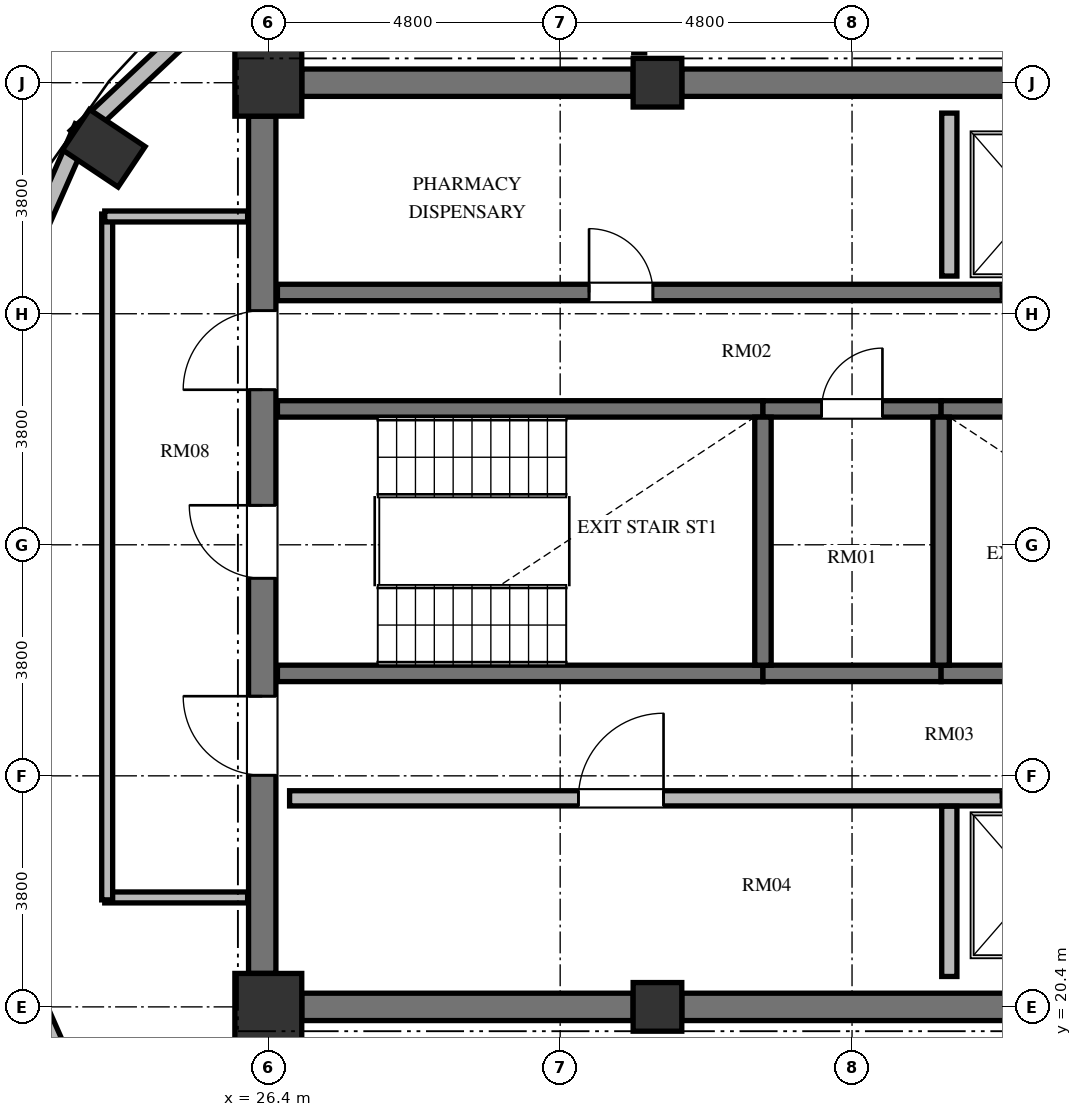
"""IFC4 building model, lengths in metres.
Left out: names, types, materials, properties, quantities, classifications, styles, units other than length and angle.
Written with IfcOpenShell. Run it as: python <this file> out.ifc"""

import sys

from ifc_helpers import new_model, si_unit, direction, frame, frame_2d, origin, origin_2d, place, context, subcontext, project, spatial, rectangle, extrude, element, fill, save


model = new_model("IFC4")
c1 = context("Model", 3, precision=1e-05, world=origin(), true_north=direction((0.0, 1.0)))
c2 = subcontext(c1, "Body", "Model", "MODEL_VIEW")
j1 = project(units=[si_unit("LENGTHUNIT", "METRE"), si_unit("PLANEANGLEUNIT", "RADIAN")], contexts=[c1])
p1 = place(None, origin())
s1 = spatial("IfcSite", under=j1, at=p1, CompositionType="ELEMENT")
p2 = place(p1, origin())
s2 = spatial("IfcBuilding", under=s1, at=p2, CompositionType="ELEMENT")
p3 = place(p2, frame((0.0, 0.0, 291.504)))
s3 = spatial("IfcBuildingStorey", under=s2, at=p3, CompositionType="ELEMENT", Elevation=291.504)
p4 = place(p3, frame((23.694, 34.522, 0.0), z_axis=(0.0, 0.0, 1.0), x_axis=(-0.831469612303, 0.55557023302, 0.0)))
e1 = element("IfcColumn", 1, at=p4, inside=s3, PredefinedType="COLUMN", context=c2, shape_type="SweptSolid", body=[
    extrude(rectangle(XDim=1.1, YDim=0.8, at=origin_2d()), origin(), (0.0, 0.0, 1.0), 3.648),
])
p5 = place(p3, frame((26.4, 20.4, 0.0), z_axis=(0.0, 0.0, 1.0), x_axis=(1.0, 0.0, 0.0)))
e2 = element("IfcColumn", 2, at=p5, inside=s3, PredefinedType="COLUMN", context=c2, shape_type="SweptSolid", body=[
    extrude(rectangle(XDim=1.1, YDim=1.1, at=origin_2d()), origin(), (0.0, 0.0, 1.0), 3.648),
])
for number, where, z_axis, x_axis in (
    (3, (32.8, 20.4, 0.0), (0.0, 0.0, 1.0), (1.0, 0.0, 0.0)),
    (4, (32.8, 35.6, 0.0), (0.0, 0.0, 1.0), (1.0, 0.0, 0.0)),
):
    element("IfcColumn", number, at=place(p3, frame(where, z_axis=z_axis, x_axis=x_axis)), inside=s3, PredefinedType="COLUMN", context=c2, shape_type="SweptSolid", body=[
        extrude(rectangle(XDim=0.8, YDim=0.8, at=origin_2d()), origin(), (0.0, 0.0, 1.0), 3.648),
    ])
p6 = place(p3, frame((26.4, 35.6, 0.0), z_axis=(0.0, 0.0, 1.0), x_axis=(1.0, 0.0, 0.0)))
e5 = element("IfcColumn", 5, at=p6, inside=s3, PredefinedType="COLUMN", context=c2, shape_type="SweptSolid", body=[
    extrude(rectangle(XDim=1.1, YDim=1.1, at=origin_2d()), origin(), (0.0, 0.0, 1.0), 3.648),
])
p7 = place(p3, frame((26.3, 20.95, 0.0), z_axis=(0.0, 0.0, 1.0), x_axis=(0.0, 1.0, 0.0)))
e6 = element("IfcWall", 6, at=p7, inside=s3, PredefinedType="SHEAR", context=c2, shape_type="SweptSolid", body=[
    extrude(rectangle(XDim=14.1, YDim=0.45, at=frame_2d((7.05, 0.0))), origin(), (0.0, 0.0, 1.0), 3.648),
])
p8 = place(p7, frame((6.5, 0.0, 0.0)))
e7 = element("IfcOpeningElement", 7, at=p8, cuts=e6, PredefinedType="OPENING", context=c2, shape_type="SweptSolid", body=[
    extrude(rectangle(XDim=1.2, YDim=2.15, at=frame_2d((0.6, 1.075))), frame((0.0, 0.235, 0.0), z_axis=(0.0, -1.0, 0.0), x_axis=(1.0, 0.0, 0.0)), (0.0, 0.0, 1.0), 0.47),
])
p9 = place(p7, frame((9.6, 0.0, 0.0)))
e8 = element("IfcOpeningElement", 8, at=p9, cuts=e6, PredefinedType="OPENING", context=c2, shape_type="SweptSolid", body=[
    extrude(rectangle(XDim=1.3, YDim=2.2, at=frame_2d((0.65, 1.1))), frame((0.0, 0.235, 0.0), z_axis=(0.0, -1.0, 0.0), x_axis=(1.0, 0.0, 0.0)), (0.0, 0.0, 1.0), 0.47),
])
p10 = place(p7, frame((3.26, 0.0, 0.0)))
e9 = element("IfcOpeningElement", 9, at=p10, cuts=e6, PredefinedType="OPENING", context=c2, shape_type="SweptSolid", body=[
    extrude(rectangle(XDim=1.3, YDim=2.2, at=frame_2d((0.65, 1.1))), frame((0.0, 0.235, 0.0), z_axis=(0.0, -1.0, 0.0), x_axis=(1.0, 0.0, 0.0)), (0.0, 0.0, 1.0), 0.47),
])
for number, where, z_axis, x_axis in (
    (10, (26.95, 20.4, 0.0), (0.0, 0.0, 1.0), (1.0, 0.0, 0.0)),
    (11, (26.95, 35.6, 0.0), (0.0, 0.0, 1.0), (1.0, 0.0, 0.0)),
):
    element("IfcWall", number, at=place(p3, frame(where, z_axis=z_axis, x_axis=x_axis)), inside=s3, PredefinedType="SHEAR", context=c2, shape_type="SweptSolid", body=[
        extrude(rectangle(XDim=5.45, YDim=0.45, at=frame_2d((2.725, 0.0))), origin(), (0.0, 0.0, 1.0), 3.648),
    ])
for number, where, z_axis, x_axis in (
    (12, (33.2, 20.4, 0.0), (0.0, 0.0, 1.0), (1.0, 0.0, 0.0)),
    (13, (33.2, 35.6, 0.0), (0.0, 0.0, 1.0), (1.0, 0.0, 0.0)),
):
    element("IfcWall", number, at=place(p3, frame(where, z_axis=z_axis, x_axis=x_axis)), inside=s3, PredefinedType="SHEAR", context=c2, shape_type="SweptSolid", body=[
        extrude(rectangle(XDim=5.6, YDim=0.45, at=frame_2d((2.8, 0.0))), origin(), (0.0, 0.0, 1.0), 3.648),
    ])
p11 = place(p3, frame((27.595, 38.808, 0.0), z_axis=(0.0, 0.0, 1.0), x_axis=(-0.728251519923, -0.685309947199, 0.0)))
e14 = element("IfcWall", 14, at=p11, inside=s3, PredefinedType="SOLIDWALL", context=c2, shape_type="SweptSolid", body=[
    extrude(rectangle(XDim=5.981, YDim=0.28, at=frame_2d((2.99, 0.0))), origin(), (0.0, 0.0, 1.0), 3.448),
])
p12 = place(p11, frame((2.391, 0.0, 0.85)))
e15 = element("IfcOpeningElement", 15, at=p12, cuts=e14, PredefinedType="OPENING", context=c2, shape_type="SweptSolid", body=[
    extrude(rectangle(XDim=1.2, YDim=1.8, at=frame_2d((0.6, 0.9))), frame((0.0, 0.15, 0.0), z_axis=(0.0, -1.0, 0.0), x_axis=(1.0, 0.0, 0.0)), (0.0, 0.0, 1.0), 0.3),
])
p13 = place(p3, frame((23.352, 34.869, 0.0), z_axis=(0.0, 0.0, 1.0), x_axis=(-0.402882523888, -0.915251698685, 0.0)))
e16 = element("IfcWall", 16, at=p13, inside=s3, PredefinedType="SOLIDWALL", context=c2, shape_type="SweptSolid", body=[
    extrude(rectangle(XDim=5.856, YDim=0.28, at=frame_2d((2.928, 0.0))), origin(), (0.0, 0.0, 1.0), 3.448),
])
p14 = place(p13, frame((2.328, 0.0, 0.85)))
e17 = element("IfcOpeningElement", 17, at=p14, cuts=e16, PredefinedType="OPENING", context=c2, shape_type="SweptSolid", body=[
    extrude(rectangle(XDim=1.2, YDim=1.8, at=frame_2d((0.6, 0.9))), frame((0.0, 0.15, 0.0), z_axis=(0.0, -1.0, 0.0), x_axis=(1.0, 0.0, 0.0)), (0.0, 0.0, 1.0), 0.3),
])
p15 = place(p3, frame((20.993, 24.09, 0.0), z_axis=(0.0, 0.0, 1.0), x_axis=(0.402867150469, -0.91525846572, 0.0)))
e18 = element("IfcWall", 18, at=p15, inside=s3, PredefinedType="SOLIDWALL", context=c2, shape_type="SweptSolid", body=[
    extrude(rectangle(XDim=5.856, YDim=0.28, at=frame_2d((2.928, 0.0))), origin(), (0.0, 0.0, 1.0), 3.448),
])
p16 = place(p15, frame((2.328, 0.0, 0.85)))
e19 = element("IfcOpeningElement", 19, at=p16, cuts=e18, PredefinedType="OPENING", context=c2, shape_type="SweptSolid", body=[
    extrude(rectangle(XDim=1.2, YDim=1.8, at=frame_2d((0.6, 0.9))), frame((0.0, 0.15, 0.0), z_axis=(0.0, -1.0, 0.0), x_axis=(1.0, 0.0, 0.0)), (0.0, 0.0, 1.0), 0.3),
])
p17 = place(p3, frame((26.55, 30.235, 0.0), z_axis=(0.0, 0.0, 1.0), x_axis=(1.0, 0.0, 0.0)))
e20 = element("IfcWall", 20, at=p17, inside=s3, PredefinedType="SHEAR", context=c2, shape_type="SweptSolid", body=[
    extrude(rectangle(XDim=7.985, YDim=0.27, at=frame_2d((3.992, 0.0))), origin(), (0.0, 0.0, 1.0), 3.648),
])
p18 = place(p3, frame((34.535, 30.235, 0.0), z_axis=(0.0, 0.0, 1.0), x_axis=(1.0, 0.0, 0.0)))
e21 = element("IfcWall", 21, at=p18, inside=s3, PredefinedType="SHEAR", context=c2, shape_type="SweptSolid", body=[
    extrude(rectangle(XDim=2.93, YDim=0.27, at=frame_2d((1.465, 0.0))), origin(), (0.0, 0.0, 1.0), 3.648),
])
p19 = place(p18, frame((0.965, 0.0, 0.0)))
e22 = element("IfcOpeningElement", 22, at=p19, cuts=e21, PredefinedType="OPENING", context=c2, shape_type="SweptSolid", body=[
    extrude(rectangle(XDim=1.0, YDim=2.1, at=frame_2d((0.5, 1.05))), frame((0.0, 0.145, 0.0), z_axis=(0.0, -1.0, 0.0), x_axis=(1.0, 0.0, 0.0)), (0.0, 0.0, 1.0), 0.29),
])
p20 = place(p3, frame((37.465, 30.235, 0.0), z_axis=(0.0, 0.0, 1.0), x_axis=(1.0, 0.0, 0.0)))
e23 = element("IfcWall", 23, at=p20, inside=s3, PredefinedType="SHEAR", context=c2, shape_type="SweptSolid", body=[
    extrude(rectangle(XDim=7.985, YDim=0.27, at=frame_2d((3.992, 0.0))), origin(), (0.0, 0.0, 1.0), 3.648),
])
p21 = place(p20, frame((6.455, 0.0, 0.0)))
e24 = element("IfcOpeningElement", 24, at=p21, cuts=e23, PredefinedType="OPENING", context=c2, shape_type="SweptSolid", body=[
    extrude(rectangle(XDim=1.2, YDim=2.15, at=frame_2d((0.6, 1.075))), frame((0.0, 0.145, 0.0), z_axis=(0.0, -1.0, 0.0), x_axis=(1.0, 0.0, 0.0)), (0.0, 0.0, 1.0), 0.29),
])
p22 = place(p3, frame((26.55, 25.885, 0.0), z_axis=(0.0, 0.0, 1.0), x_axis=(1.0, 0.0, 0.0)))
e25 = element("IfcWall", 25, at=p22, inside=s3, PredefinedType="SHEAR", context=c2, shape_type="SweptSolid", body=[
    extrude(rectangle(XDim=7.985, YDim=0.27, at=frame_2d((3.992, 0.0))), origin(), (0.0, 0.0, 1.0), 3.648),
])
p23 = place(p3, frame((34.535, 25.885, 0.0), z_axis=(0.0, 0.0, 1.0), x_axis=(1.0, 0.0, 0.0)))
e26 = element("IfcWall", 26, at=p23, inside=s3, PredefinedType="SHEAR", context=c2, shape_type="SweptSolid", body=[
    extrude(rectangle(XDim=2.93, YDim=0.27, at=frame_2d((1.465, 0.0))), origin(), (0.0, 0.0, 1.0), 3.648),
])
p24 = place(p3, frame((37.465, 25.885, 0.0), z_axis=(0.0, 0.0, 1.0), x_axis=(1.0, 0.0, 0.0)))
e27 = element("IfcWall", 27, at=p24, inside=s3, PredefinedType="SHEAR", context=c2, shape_type="SweptSolid", body=[
    extrude(rectangle(XDim=7.985, YDim=0.27, at=frame_2d((3.992, 0.0))), origin(), (0.0, 0.0, 1.0), 3.648),
])
for number, where, z_axis, x_axis in (
    (28, (34.535, 26.02, 0.0), (0.0, 0.0, 1.0), (0.0, 1.0, 0.0)),
    (29, (37.465, 26.02, 0.0), (0.0, 0.0, 1.0), (0.0, 1.0, 0.0)),
):
    element("IfcWall", number, at=place(p3, frame(where, z_axis=z_axis, x_axis=x_axis)), inside=s3, PredefinedType="SHEAR", context=c2, shape_type="SweptSolid", body=[
        extrude(rectangle(XDim=4.08, YDim=0.27, at=frame_2d((2.04, 0.0))), origin(), (0.0, 0.0, 1.0), 3.648),
    ])
p25 = place(p3, frame((26.55, 32.15, 0.0), z_axis=(0.0, 0.0, 1.0), x_axis=(1.0, 0.0, 0.0)))
e30 = element("IfcWall", 30, at=p25, inside=s3, PredefinedType="SHEAR", context=c2, shape_type="SweptSolid", body=[
    extrude(rectangle(XDim=16.4, YDim=0.27, at=frame_2d((8.2, 0.0))), origin(), (0.0, 0.0, 1.0), 3.648),
])
p26 = place(p25, frame((5.125, 0.0, 0.0)))
e31 = element("IfcOpeningElement", 31, at=p26, cuts=e30, PredefinedType="OPENING", context=c2, shape_type="SweptSolid", body=[
    extrude(rectangle(XDim=1.05, YDim=2.15, at=frame_2d((0.525, 1.075))), frame((0.0, 0.145, 0.0), z_axis=(0.0, -1.0, 0.0), x_axis=(1.0, 0.0, 0.0)), (0.0, 0.0, 1.0), 0.29),
])
p27 = place(p25, frame((11.9, 0.0, 0.0)))
e32 = element("IfcOpeningElement", 32, at=p27, cuts=e30, PredefinedType="OPENING", context=c2, shape_type="SweptSolid", body=[
    extrude(rectangle(XDim=1.1, YDim=2.2, at=frame_2d((0.55, 1.1))), frame((0.0, 0.145, 0.0), z_axis=(0.0, -1.0, 0.0), x_axis=(1.0, 0.0, 0.0)), (0.0, 0.0, 1.0), 0.29),
])
p28 = place(p25, frame((14.5, 0.0, 0.0)))
e33 = element("IfcOpeningElement", 33, at=p28, cuts=e30, PredefinedType="OPENING", context=c2, shape_type="SweptSolid", body=[
    extrude(rectangle(XDim=1.1, YDim=2.2, at=frame_2d((0.55, 1.1))), frame((0.0, 0.145, 0.0), z_axis=(0.0, -1.0, 0.0), x_axis=(1.0, 0.0, 0.0)), (0.0, 0.0, 1.0), 0.29),
])
p29 = place(p3, frame((26.75, 23.83, 0.0), z_axis=(0.0, 0.0, 1.0), x_axis=(1.0, 0.0, 0.0)))
e34 = element("IfcWall", 34, at=p29, inside=s3, PredefinedType="SOLIDWALL", context=c2, shape_type="SweptSolid", body=[
    extrude(rectangle(XDim=16.2, YDim=0.25, at=frame_2d((8.1, 0.0))), origin(), (0.0, 0.0, 1.0), 3.448),
])
p30 = place(p29, frame((4.75, 0.0, 0.0)))
e35 = element("IfcOpeningElement", 35, at=p30, cuts=e34, PredefinedType="OPENING", context=c2, shape_type="SweptSolid", body=[
    extrude(rectangle(XDim=1.4, YDim=2.2, at=frame_2d((0.7, 1.1))), frame((0.0, 0.135, 0.0), z_axis=(0.0, -1.0, 0.0), x_axis=(1.0, 0.0, 0.0)), (0.0, 0.0, 1.0), 0.27),
])
p31 = place(p29, frame((11.7, 0.0, 0.0)))
e36 = element("IfcOpeningElement", 36, at=p31, cuts=e34, PredefinedType="OPENING", context=c2, shape_type="SweptSolid", body=[
    extrude(rectangle(XDim=1.1, YDim=2.2, at=frame_2d((0.55, 1.1))), frame((0.0, 0.135, 0.0), z_axis=(0.0, -1.0, 0.0), x_axis=(1.0, 0.0, 0.0)), (0.0, 0.0, 1.0), 0.27),
])
p32 = place(p29, frame((14.15, 0.0, 0.0)))
e37 = element("IfcOpeningElement", 37, at=p32, cuts=e34, PredefinedType="OPENING", context=c2, shape_type="SweptSolid", body=[
    extrude(rectangle(XDim=1.4, YDim=2.3, at=frame_2d((0.7, 1.15))), frame((0.0, 0.135, 0.0), z_axis=(0.0, -1.0, 0.0), x_axis=(1.0, 0.0, 0.0)), (0.0, 0.0, 1.0), 0.27),
])
p33 = place(p3, frame((37.6, 32.42, 0.0), z_axis=(0.0, 0.0, 1.0), x_axis=(0.0, 1.0, 0.0)))
e38 = element("IfcWall", 38, at=p33, inside=s3, PredefinedType="SOLIDWALL", context=c2, shape_type="SweptSolid", body=[
    extrude(rectangle(XDim=2.68, YDim=0.25, at=frame_2d((1.34, 0.0))), origin(), (0.0, 0.0, 1.0), 3.448),
])
p34 = place(p3, frame((37.6, 20.9, 0.0), z_axis=(0.0, 0.0, 1.0), x_axis=(0.0, 1.0, 0.0)))
e39 = element("IfcWall", 39, at=p34, inside=s3, PredefinedType="SOLIDWALL", context=c2, shape_type="SweptSolid", body=[
    extrude(rectangle(XDim=2.8, YDim=0.25, at=frame_2d((1.4, 0.0))), origin(), (0.0, 0.0, 1.0), 3.448),
])
p35 = place(p3, frame((32.5, 36.09, 0.0), z_axis=(0.0, 0.0, 1.0), x_axis=(0.0, 1.0, 0.0)))
e40 = element("IfcWall", 40, at=p35, inside=s3, PredefinedType="PARTITIONING", context=c2, shape_type="SweptSolid", body=[
    extrude(rectangle(XDim=2.35, YDim=0.18, at=frame_2d((1.175, 0.0))), origin(), (0.0, 0.0, 1.0), 3.448),
])
p36 = place(p3, frame((26.06, 22.2, 0.0), z_axis=(0.0, 0.0, 1.0), x_axis=(-1.0, 0.0, 0.0)))
e41 = element("IfcWall", 41, at=p36, inside=s3, PredefinedType="PARTITIONING", context=c2, shape_type="SweptSolid", body=[
    extrude(rectangle(XDim=2.35, YDim=0.18, at=frame_2d((1.175, 0.0))), origin(), (0.0, 0.0, 1.0), 3.448),
])
p37 = place(p3, frame((23.75, 22.16, 0.0), z_axis=(0.0, 0.0, 1.0), x_axis=(0.0, 1.0, 0.0)))
e42 = element("IfcWall", 42, at=p37, inside=s3, PredefinedType="PARTITIONING", context=c2, shape_type="SweptSolid", body=[
    extrude(rectangle(XDim=11.28, YDim=0.18, at=frame_2d((5.64, 0.0))), origin(), (0.0, 0.0, 1.0), 3.448),
])
p38 = place(p3, frame((23.71, 33.4, 0.0), z_axis=(0.0, 0.0, 1.0), x_axis=(1.0, 0.0, 0.0)))
e43 = element("IfcWall", 43, at=p38, inside=s3, PredefinedType="PARTITIONING", context=c2, shape_type="SweptSolid", body=[
    extrude(rectangle(XDim=2.35, YDim=0.18, at=frame_2d((1.175, 0.0))), origin(), (0.0, 0.0, 1.0), 3.448),
])
p39 = place(p8, origin())
e44 = element("IfcDoor", 44, at=p39, inside=s3, OperationType="SINGLE_SWING_RIGHT", PredefinedType="DOOR", context=c2, shape_type="SweptSolid", body=[
    extrude(rectangle(XDim=1.2, YDim=2.15, at=frame_2d((0.6, 1.075))), frame((0.0, 0.025, 0.0), z_axis=(0.0, -1.0, 0.0), x_axis=(1.0, 0.0, 0.0)), (0.0, 0.0, 1.0), 0.05),
])
fill(e7, e44)
p40 = place(p19, origin())
e45 = element("IfcDoor", 45, at=p40, inside=s3, OperationType="SINGLE_SWING_RIGHT", PredefinedType="DOOR", context=c2, shape_type="SweptSolid", body=[
    extrude(rectangle(XDim=1.0, YDim=2.1, at=frame_2d((0.5, 1.05))), frame((0.0, 0.025, 0.0), z_axis=(0.0, -1.0, 0.0), x_axis=(1.0, 0.0, 0.0)), (0.0, 0.0, 1.0), 0.05),
])
fill(e22, e45)
p41 = place(p9, origin())
e46 = element("IfcDoor", 46, at=p41, inside=s3, OperationType="SINGLE_SWING_LEFT", PredefinedType="DOOR", context=c2, shape_type="SweptSolid", body=[
    extrude(rectangle(XDim=1.3, YDim=2.2, at=frame_2d((0.65, 1.1))), frame((0.0, 0.025, 0.0), z_axis=(0.0, -1.0, 0.0), x_axis=(1.0, 0.0, 0.0)), (0.0, 0.0, 1.0), 0.05),
])
fill(e8, e46)
p42 = place(p10, origin())
e47 = element("IfcDoor", 47, at=p42, inside=s3, OperationType="SINGLE_SWING_RIGHT", PredefinedType="DOOR", context=c2, shape_type="SweptSolid", body=[
    extrude(rectangle(XDim=1.3, YDim=2.2, at=frame_2d((0.65, 1.1))), frame((0.0, 0.025, 0.0), z_axis=(0.0, -1.0, 0.0), x_axis=(1.0, 0.0, 0.0)), (0.0, 0.0, 1.0), 0.05),
])
fill(e9, e47)
p43 = place(p26, origin())
e48 = element("IfcDoor", 48, at=p43, inside=s3, OperationType="SINGLE_SWING_LEFT", PredefinedType="DOOR", context=c2, shape_type="SweptSolid", body=[
    extrude(rectangle(XDim=1.05, YDim=2.15, at=frame_2d((0.525, 1.075))), frame((0.0, 0.025, 0.0), z_axis=(0.0, -1.0, 0.0), x_axis=(1.0, 0.0, 0.0)), (0.0, 0.0, 1.0), 0.05),
])
fill(e31, e48)
p44 = place(p30, origin())
e49 = element("IfcDoor", 49, at=p44, inside=s3, OperationType="SINGLE_SWING_RIGHT", PredefinedType="DOOR", context=c2, shape_type="SweptSolid", body=[
    extrude(rectangle(XDim=1.4, YDim=2.2, at=frame_2d((0.7, 1.1))), frame((0.0, 0.025, 0.0), z_axis=(0.0, -1.0, 0.0), x_axis=(1.0, 0.0, 0.0)), (0.0, 0.0, 1.0), 0.05),
])
fill(e35, e49)
p45 = place(p27, origin())
e50 = element("IfcDoor", 50, at=p45, inside=s3, OperationType="SLIDING_TO_LEFT", PredefinedType="DOOR", context=c2, shape_type="SweptSolid", body=[
    extrude(rectangle(XDim=1.1, YDim=2.2, at=frame_2d((0.55, 1.1))), frame((0.0, 0.025, 0.0), z_axis=(0.0, -1.0, 0.0), x_axis=(1.0, 0.0, 0.0)), (0.0, 0.0, 1.0), 0.05),
])
fill(e32, e50)
p46 = place(p31, origin())
e51 = element("IfcDoor", 51, at=p46, inside=s3, OperationType="SLIDING_TO_LEFT", PredefinedType="DOOR", context=c2, shape_type="SweptSolid", body=[
    extrude(rectangle(XDim=1.1, YDim=2.2, at=frame_2d((0.55, 1.1))), frame((0.0, 0.025, 0.0), z_axis=(0.0, -1.0, 0.0), x_axis=(1.0, 0.0, 0.0)), (0.0, 0.0, 1.0), 0.05),
])
fill(e36, e51)
save(model, sys.argv[1])
